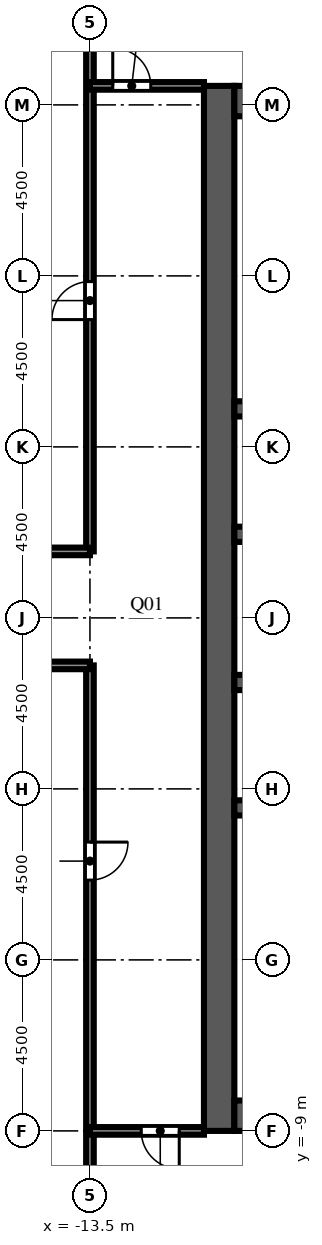
"""IFC4 building model, lengths in metres.
Left out: names, types, materials, properties, quantities, classifications, styles, units other than length and angle.
Written with IfcOpenShell. Run it as: python <this file> out.ifc"""

import sys

from ifc_helpers import new_model, si_unit, direction, frame, frame_2d, origin, place, context, subcontext, project, spatial, rectangle, extrude, element, fill, save


model = new_model("IFC4")
c1 = context("Model", 3, precision=1e-05, world=origin(), true_north=direction((0.0, 1.0)))
c2 = subcontext(c1, "Body", "Model", "MODEL_VIEW")
j1 = project(units=[si_unit("LENGTHUNIT", "METRE"), si_unit("PLANEANGLEUNIT", "RADIAN")], contexts=[c1])
p1 = place(None, origin())
s1 = spatial("IfcSite", under=j1, at=p1, CompositionType="ELEMENT")
p2 = place(p1, origin())
s2 = spatial("IfcBuilding", under=s1, at=p2, CompositionType="ELEMENT")
p3 = place(p2, frame((0.0, 0.0, 220.2)))
s3 = spatial("IfcBuildingStorey", under=s2, at=p3, CompositionType="ELEMENT", Elevation=220.2)
p4 = place(p3, frame((-10.1, -9.0, 0.0), z_axis=(0.0, 0.0, 1.0), x_axis=(0.0, 1.0, 0.0)))
e1 = element("IfcWall", 1, at=p4, inside=s3, PredefinedType="SHEAR", context=c2, shape_type="SweptSolid", body=[
    extrude(rectangle(XDim=27.5, YDim=0.8, at=frame_2d((13.75, 0.0))), origin(), (0.0, 0.0, 1.0), 6.0),
])
p5 = place(p4, frame((12.55, 0.0, 0.0)))
e2 = element("IfcOpeningElement", 2, at=p5, cuts=e1, PredefinedType="OPENING", context=c2, shape_type="SweptSolid", body=[
    extrude(rectangle(XDim=2.4, YDim=2.4, at=frame_2d((1.2, 1.2))), frame((0.0, 0.41, 0.0), z_axis=(0.0, -1.0, 0.0), x_axis=(1.0, 0.0, 0.0)), (0.0, 0.0, 1.0), 0.82),
])
p6 = place(p4, frame((6.825, 0.0, 0.0)))
e3 = element("IfcOpeningElement", 3, at=p6, cuts=e1, PredefinedType="OPENING", context=c2, shape_type="SweptSolid", body=[
    extrude(rectangle(XDim=1.2, YDim=2.1, at=frame_2d((0.6, 1.05))), frame((0.0, 0.41, 0.0), z_axis=(0.0, -1.0, 0.0), x_axis=(1.0, 0.0, 0.0)), (0.0, 0.0, 1.0), 0.82),
])
p7 = place(p4, frame((19.475, 0.0, 0.0)))
e4 = element("IfcOpeningElement", 4, at=p7, cuts=e1, PredefinedType="OPENING", context=c2, shape_type="SweptSolid", body=[
    extrude(rectangle(XDim=1.2, YDim=2.1, at=frame_2d((0.6, 1.05))), frame((0.0, 0.41, 0.0), z_axis=(0.0, -1.0, 0.0), x_axis=(1.0, 0.0, 0.0)), (0.0, 0.0, 1.0), 0.82),
])
for number, where, z_axis, x_axis in (
    (5, (-9.7, -8.6, 0.0), (0.0, 0.0, 1.0), (1.0, 0.0, 0.0)),
    (6, (-9.7, 18.1, 0.0), (0.0, 0.0, 1.0), (1.0, 0.0, 0.0)),
):
    element("IfcWall", number, at=place(p3, frame(where, z_axis=z_axis, x_axis=x_axis)), inside=s3, PredefinedType="SHEAR", context=c2, shape_type="SweptSolid", body=[
        extrude(rectangle(XDim=10.4, YDim=0.8, at=frame_2d((5.2, 0.0))), origin(), (0.0, 0.0, 1.0), 6.0),
    ])
p8 = place(p3, frame((-9.7, -0.5, 0.0), z_axis=(0.0, 0.0, 1.0), x_axis=(1.0, 0.0, 0.0)))
e7 = element("IfcWall", 7, at=p8, inside=s3, PredefinedType="SHEAR", context=c2, shape_type="SweptSolid", body=[
    extrude(rectangle(XDim=10.4, YDim=0.4, at=frame_2d((5.2, 0.0))), origin(), (0.0, 0.0, 1.0), 6.0),
])
p9 = place(p3, frame((-9.7, 2.8, 0.0), z_axis=(0.0, 0.0, 1.0), x_axis=(1.0, 0.0, 0.0)))
e8 = element("IfcWall", 8, at=p9, inside=s3, PredefinedType="SHEAR", context=c2, shape_type="SweptSolid", body=[
    extrude(rectangle(XDim=10.4, YDim=0.4, at=frame_2d((5.2, 0.0))), origin(), (0.0, 0.0, 1.0), 6.0),
])
p10 = place(p9, frame((0.738, 0.0, 0.0)))
e9 = element("IfcOpeningElement", 9, at=p10, cuts=e8, PredefinedType="OPENING", context=c2, shape_type="SweptSolid", body=[
    extrude(rectangle(XDim=1.1, YDim=2.1, at=frame_2d((0.55, 1.05))), frame((0.0, 0.21, 0.0), z_axis=(0.0, -1.0, 0.0), x_axis=(1.0, 0.0, 0.0)), (0.0, 0.0, 1.0), 0.42),
])
p11 = place(p9, frame((3.337, 0.0, 0.0)))
e10 = element("IfcOpeningElement", 10, at=p11, cuts=e8, PredefinedType="OPENING", context=c2, shape_type="SweptSolid", body=[
    extrude(rectangle(XDim=1.1, YDim=2.1, at=frame_2d((0.55, 1.05))), frame((0.0, 0.21, 0.0), z_axis=(0.0, -1.0, 0.0), x_axis=(1.0, 0.0, 0.0)), (0.0, 0.0, 1.0), 0.42),
])
p12 = place(p9, frame((6.012, 0.0, 0.0)))
e11 = element("IfcOpeningElement", 11, at=p12, cuts=e8, PredefinedType="OPENING", context=c2, shape_type="SweptSolid", body=[
    extrude(rectangle(XDim=1.0, YDim=2.1, at=frame_2d((0.5, 1.05))), frame((0.0, 0.21, 0.0), z_axis=(0.0, -1.0, 0.0), x_axis=(1.0, 0.0, 0.0)), (0.0, 0.0, 1.0), 0.42),
])
p13 = place(p9, frame((8.613, 0.0, 0.0)))
e12 = element("IfcOpeningElement", 12, at=p13, cuts=e8, PredefinedType="OPENING", context=c2, shape_type="SweptSolid", body=[
    extrude(rectangle(XDim=1.0, YDim=2.1, at=frame_2d((0.5, 1.05))), frame((0.0, 0.21, 0.0), z_axis=(0.0, -1.0, 0.0), x_axis=(1.0, 0.0, 0.0)), (0.0, 0.0, 1.0), 0.42),
])
p14 = place(p3, frame((-9.7, 6.7, 0.0), z_axis=(0.0, 0.0, 1.0), x_axis=(1.0, 0.0, 0.0)))
e13 = element("IfcWall", 13, at=p14, inside=s3, PredefinedType="SHEAR", context=c2, shape_type="SweptSolid", body=[
    extrude(rectangle(XDim=10.4, YDim=0.4, at=frame_2d((5.2, 0.0))), origin(), (0.0, 0.0, 1.0), 6.0),
])
p15 = place(p14, frame((3.337, 0.0, 0.0)))
e14 = element("IfcOpeningElement", 14, at=p15, cuts=e13, PredefinedType="OPENING", context=c2, shape_type="SweptSolid", body=[
    extrude(rectangle(XDim=1.1, YDim=2.1, at=frame_2d((0.55, 1.05))), frame((0.0, 0.21, 0.0), z_axis=(0.0, -1.0, 0.0), x_axis=(1.0, 0.0, 0.0)), (0.0, 0.0, 1.0), 0.42),
])
p16 = place(p14, frame((5.962, 0.0, 0.0)))
e15 = element("IfcOpeningElement", 15, at=p16, cuts=e13, PredefinedType="OPENING", context=c2, shape_type="SweptSolid", body=[
    extrude(rectangle(XDim=1.1, YDim=2.1, at=frame_2d((0.55, 1.05))), frame((0.0, 0.21, 0.0), z_axis=(0.0, -1.0, 0.0), x_axis=(1.0, 0.0, 0.0)), (0.0, 0.0, 1.0), 0.42),
])
p17 = place(p14, frame((8.663, 0.0, 0.0)))
e16 = element("IfcOpeningElement", 16, at=p17, cuts=e13, PredefinedType="OPENING", context=c2, shape_type="SweptSolid", body=[
    extrude(rectangle(XDim=1.1, YDim=2.1, at=frame_2d((0.55, 1.05))), frame((0.0, 0.21, 0.0), z_axis=(0.0, -1.0, 0.0), x_axis=(1.0, 0.0, 0.0)), (0.0, 0.0, 1.0), 0.42),
])
p18 = place(p14, frame((0.688, 0.0, 0.0)))
e17 = element("IfcOpeningElement", 17, at=p18, cuts=e13, PredefinedType="OPENING", context=c2, shape_type="SweptSolid", body=[
    extrude(rectangle(XDim=1.0, YDim=2.1, at=frame_2d((0.5, 1.05))), frame((0.0, 0.21, 0.0), z_axis=(0.0, -1.0, 0.0), x_axis=(1.0, 0.0, 0.0)), (0.0, 0.0, 1.0), 0.42),
])
p19 = place(p3, frame((-9.7, 10.0, 0.0), z_axis=(0.0, 0.0, 1.0), x_axis=(1.0, 0.0, 0.0)))
e18 = element("IfcWall", 18, at=p19, inside=s3, PredefinedType="SHEAR", context=c2, shape_type="SweptSolid", body=[
    extrude(rectangle(XDim=10.4, YDim=0.4, at=frame_2d((5.2, 0.0))), origin(), (0.0, 0.0, 1.0), 6.0),
])
p20 = place(p3, frame((-13.5, -22.05, 0.0), z_axis=(0.0, 0.0, 1.0), x_axis=(0.0, 1.0, 0.0)))
e19 = element("IfcWall", 19, at=p20, inside=s3, PredefinedType="PARTITIONING", context=c2, shape_type="SweptSolid", body=[
    extrude(rectangle(XDim=25.3, YDim=0.2, at=frame_2d((12.65, 0.0))), origin(), (0.0, 0.0, 1.0), 5.4),
])
p21 = place(p20, frame((19.65, 0.0, 0.0)))
e20 = element("IfcOpeningElement", 20, at=p21, cuts=e19, PredefinedType="OPENING", context=c2, shape_type="SweptSolid", body=[
    extrude(rectangle(XDim=1.0, YDim=2.1, at=frame_2d((0.5, 1.05))), frame((0.0, 0.11, 0.0), z_axis=(0.0, -1.0, 0.0), x_axis=(1.0, 0.0, 0.0)), (0.0, 0.0, 1.0), 0.22),
])
p22 = place(p3, frame((-13.5, 6.25, 0.0), z_axis=(0.0, 0.0, 1.0), x_axis=(0.0, 1.0, 0.0)))
e21 = element("IfcWall", 21, at=p22, inside=s3, PredefinedType="PARTITIONING", context=c2, shape_type="SweptSolid", body=[
    extrude(rectangle(XDim=20.25, YDim=0.2, at=frame_2d((10.125, 0.0))), origin(), (0.0, 0.0, 1.0), 5.4),
])
p23 = place(p22, frame((6.1, 0.0, 0.0)))
e22 = element("IfcOpeningElement", 22, at=p23, cuts=e21, PredefinedType="OPENING", context=c2, shape_type="SweptSolid", body=[
    extrude(rectangle(XDim=1.0, YDim=2.1, at=frame_2d((0.5, 1.05))), frame((0.0, 0.11, 0.0), z_axis=(0.0, -1.0, 0.0), x_axis=(1.0, 0.0, 0.0)), (0.0, 0.0, 1.0), 0.22),
])
p24 = place(p3, frame((-10.5, -9.0, 0.0), z_axis=(0.0, 0.0, 1.0), x_axis=(-1.0, 0.0, 0.0)))
e23 = element("IfcWall", 23, at=p24, inside=s3, PredefinedType="PARTITIONING", context=c2, shape_type="SweptSolid", body=[
    extrude(rectangle(XDim=3.0, YDim=0.2, at=frame_2d((1.5, 0.0))), origin(), (0.0, 0.0, 1.0), 5.4),
])
p25 = place(p24, frame((0.65, 0.0, 0.0)))
e24 = element("IfcOpeningElement", 24, at=p25, cuts=e23, PredefinedType="OPENING", context=c2, shape_type="SweptSolid", body=[
    extrude(rectangle(XDim=1.0, YDim=2.1, at=frame_2d((0.5, 1.05))), frame((0.0, 0.11, 0.0), z_axis=(0.0, -1.0, 0.0), x_axis=(1.0, 0.0, 0.0)), (0.0, 0.0, 1.0), 0.22),
])
for number, where, z_axis, x_axis in (
    (25, (-17.55, 3.25, 0.0), (0.0, 0.0, 1.0), (1.0, 0.0, 0.0)),
    (26, (-17.55, 6.25, 0.0), (0.0, 0.0, 1.0), (1.0, 0.0, 0.0)),
):
    element("IfcWall", number, at=place(p3, frame(where, z_axis=z_axis, x_axis=x_axis)), inside=s3, PredefinedType="PARTITIONING", context=c2, shape_type="SweptSolid", body=[
        extrude(rectangle(XDim=4.05, YDim=0.2, at=frame_2d((2.025, 0.0))), origin(), (0.0, 0.0, 1.0), 5.4),
    ])
p26 = place(p3, frame((-13.5, 18.5, 0.0), z_axis=(0.0, 0.0, 1.0), x_axis=(1.0, 0.0, 0.0)))
e27 = element("IfcWall", 27, at=p26, inside=s3, PredefinedType="PARTITIONING", context=c2, shape_type="SweptSolid", body=[
    extrude(rectangle(XDim=3.0, YDim=0.2, at=frame_2d((1.5, 0.0))), origin(), (0.0, 0.0, 1.0), 5.4),
])
p27 = place(p26, frame((0.6, 0.0, 0.0)))
e28 = element("IfcOpeningElement", 28, at=p27, cuts=e27, PredefinedType="OPENING", context=c2, shape_type="SweptSolid", body=[
    extrude(rectangle(XDim=1.0, YDim=2.1, at=frame_2d((0.5, 1.05))), frame((0.0, 0.11, 0.0), z_axis=(0.0, -1.0, 0.0), x_axis=(1.0, 0.0, 0.0)), (0.0, 0.0, 1.0), 0.22),
])
p28 = place(p5, origin())
e29 = element("IfcDoor", 29, at=p28, inside=s3, OperationType="DOUBLE_DOOR_DOUBLE_SWING", PredefinedType="DOOR", context=c2, shape_type="SweptSolid", body=[
    extrude(rectangle(XDim=2.4, YDim=2.4, at=frame_2d((1.2, 1.2))), frame((0.0, 0.025, 0.0), z_axis=(0.0, -1.0, 0.0), x_axis=(1.0, 0.0, 0.0)), (0.0, 0.0, 1.0), 0.05),
])
fill(e2, e29)
p29 = place(p6, origin())
e30 = element("IfcDoor", 30, at=p29, inside=s3, OperationType="SINGLE_SWING_LEFT", PredefinedType="DOOR", context=c2, shape_type="SweptSolid", body=[
    extrude(rectangle(XDim=1.2, YDim=2.1, at=frame_2d((0.6, 1.05))), frame((0.0, 0.025, 0.0), z_axis=(0.0, -1.0, 0.0), x_axis=(1.0, 0.0, 0.0)), (0.0, 0.0, 1.0), 0.05),
])
fill(e3, e30)
p30 = place(p7, origin())
e31 = element("IfcDoor", 31, at=p30, inside=s3, OperationType="SINGLE_SWING_LEFT", PredefinedType="DOOR", context=c2, shape_type="SweptSolid", body=[
    extrude(rectangle(XDim=1.2, YDim=2.1, at=frame_2d((0.6, 1.05))), frame((0.0, 0.025, 0.0), z_axis=(0.0, -1.0, 0.0), x_axis=(1.0, 0.0, 0.0)), (0.0, 0.0, 1.0), 0.05),
])
fill(e4, e31)
p31 = place(p21, origin())
e32 = element("IfcDoor", 32, at=p31, inside=s3, OperationType="SINGLE_SWING_RIGHT", PredefinedType="DOOR", context=c2, shape_type="SweptSolid", body=[
    extrude(rectangle(XDim=1.0, YDim=2.1, at=frame_2d((0.5, 1.05))), frame((0.0, 0.025, 0.0), z_axis=(0.0, -1.0, 0.0), x_axis=(1.0, 0.0, 0.0)), (0.0, 0.0, 1.0), 0.05),
])
fill(e20, e32)
p32 = place(p23, origin())
e33 = element("IfcDoor", 33, at=p32, inside=s3, OperationType="SINGLE_SWING_LEFT", PredefinedType="DOOR", context=c2, shape_type="SweptSolid", body=[
    extrude(rectangle(XDim=1.0, YDim=2.1, at=frame_2d((0.5, 1.05))), frame((0.0, 0.025, 0.0), z_axis=(0.0, -1.0, 0.0), x_axis=(1.0, 0.0, 0.0)), (0.0, 0.0, 1.0), 0.05),
])
fill(e22, e33)
p33 = place(p25, origin())
e34 = element("IfcDoor", 34, at=p33, inside=s3, OperationType="SINGLE_SWING_LEFT", PredefinedType="DOOR", context=c2, shape_type="SweptSolid", body=[
    extrude(rectangle(XDim=1.0, YDim=2.1, at=frame_2d((0.5, 1.05))), frame((0.0, 0.025, 0.0), z_axis=(0.0, -1.0, 0.0), x_axis=(1.0, 0.0, 0.0)), (0.0, 0.0, 1.0), 0.05),
])
fill(e24, e34)
p34 = place(p27, origin())
e35 = element("IfcDoor", 35, at=p34, inside=s3, OperationType="SINGLE_SWING_LEFT", PredefinedType="DOOR", context=c2, shape_type="SweptSolid", body=[
    extrude(rectangle(XDim=1.0, YDim=2.1, at=frame_2d((0.5, 1.05))), frame((0.0, 0.025, 0.0), z_axis=(0.0, -1.0, 0.0), x_axis=(1.0, 0.0, 0.0)), (0.0, 0.0, 1.0), 0.05),
])
fill(e28, e35)
save(model, sys.argv[1])
